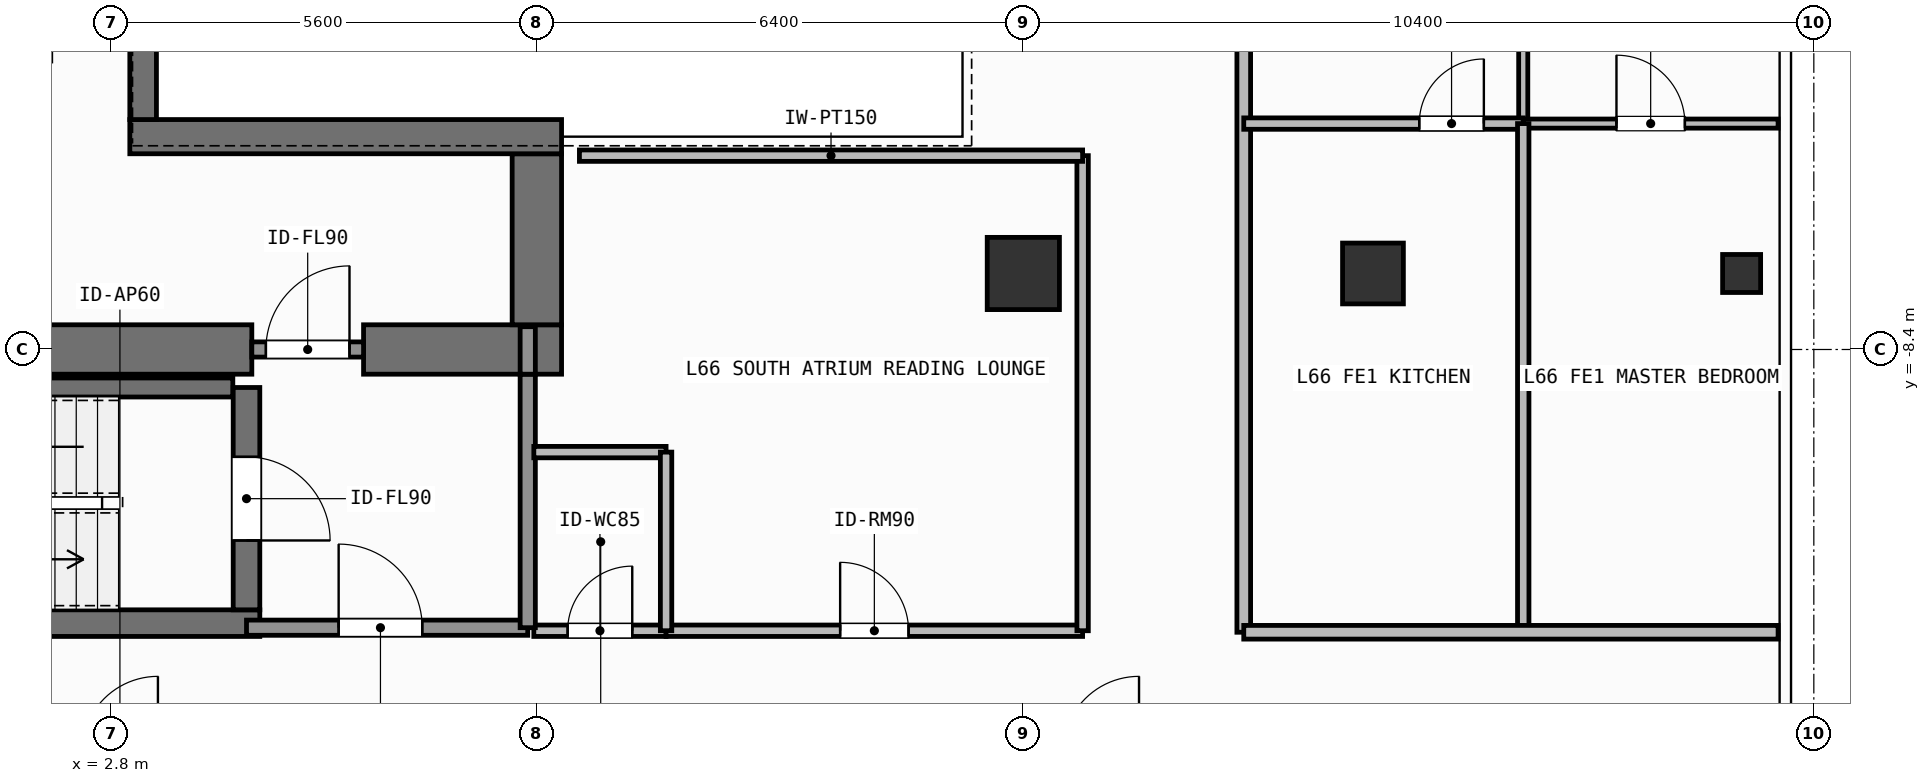
"""IFC4 building model, lengths in metres.
Left out: names, types, materials, properties, quantities, classifications, styles, units other than length and angle.
Written with IfcOpenShell. Run it as: python <this file> out.ifc"""

import sys

from ifc_helpers import new_model, si_unit, direction, frame, frame_2d, origin, origin_2d, place, context, subcontext, project, spatial, rectangle, hollow_rectangle, extrude, element, fill, save


model = new_model("IFC4")
c1 = context("Model", 3, precision=1e-05, world=origin(), true_north=direction((0.0, 1.0)))
c2 = subcontext(c1, "Body", "Model", "MODEL_VIEW")
j1 = project(units=[si_unit("LENGTHUNIT", "METRE"), si_unit("PLANEANGLEUNIT", "RADIAN")], contexts=[c1])
p1 = place(None, origin())
s1 = spatial("IfcSite", under=j1, at=p1, CompositionType="ELEMENT")
p2 = place(p1, origin())
s2 = spatial("IfcBuilding", under=s1, at=p2, CompositionType="ELEMENT")
p3 = place(p2, frame((0.0, 0.0, 270.3)))
s3 = spatial("IfcBuildingStorey", under=s2, at=p3, CompositionType="ELEMENT", Elevation=270.3)
p4 = place(p3, frame((-2.62, -8.4, 0.0), z_axis=(0.0, 0.0, 1.0), x_axis=(1.0, 0.0, 0.0)))
e1 = element("IfcWall", 1, at=p4, inside=s3, PredefinedType="SHEAR", context=c2, shape_type="SweptSolid", body=[
    extrude(rectangle(XDim=7.27, YDim=0.65, at=frame_2d((3.635, 0.0))), origin(), (0.0, 0.0, 1.0), 3.9),
])
p5 = place(p3, frame((6.12, -8.4, 0.0), z_axis=(0.0, 0.0, 1.0), x_axis=(1.0, 0.0, 0.0)))
e2 = element("IfcWall", 2, at=p5, inside=s3, PredefinedType="SHEAR", context=c2, shape_type="SweptSolid", body=[
    extrude(rectangle(XDim=2.605, YDim=0.65, at=frame_2d((1.302, 0.0))), origin(), (0.0, 0.0, 1.0), 3.9),
])
p6 = place(p3, frame((8.4, -8.075, 0.0), z_axis=(0.0, 0.0, 1.0), x_axis=(0.0, 1.0, 0.0)))
e3 = element("IfcWall", 3, at=p6, inside=s3, PredefinedType="SHEAR", context=c2, shape_type="SweptSolid", body=[
    extrude(rectangle(XDim=2.25, YDim=0.65, at=frame_2d((1.125, 0.0))), origin(), (0.0, 0.0, 1.0), 3.9),
])
p7 = place(p3, frame((3.045, -5.6, 0.0), z_axis=(0.0, 0.0, 1.0), x_axis=(1.0, 0.0, 0.0)))
e4 = element("IfcWall", 4, at=p7, inside=s3, PredefinedType="SHEAR", context=c2, shape_type="SweptSolid", body=[
    extrude(rectangle(XDim=5.68, YDim=0.45, at=frame_2d((2.84, 0.0))), origin(), (0.0, 0.0, 1.0), 3.9),
])
p8 = place(p3, frame((3.22, -5.375, 0.0), z_axis=(0.0, 0.0, 1.0), x_axis=(0.0, 1.0, 0.0)))
e5 = element("IfcWall", 5, at=p8, inside=s3, PredefinedType="SHEAR", context=c2, shape_type="SweptSolid", body=[
    extrude(rectangle(XDim=10.75, YDim=0.35, at=frame_2d((5.375, 0.0))), origin(), (0.0, 0.0, 1.0), 3.9),
])
p9 = place(p3, frame((-2.555, -12.0, 0.0), z_axis=(0.0, 0.0, 1.0), x_axis=(1.0, 0.0, 0.0)))
e6 = element("IfcWall", 6, at=p9, inside=s3, PredefinedType="SHEAR", context=c2, shape_type="SweptSolid", body=[
    extrude(rectangle(XDim=7.31, YDim=0.35, at=frame_2d((3.655, 0.0))), origin(), (0.0, 0.0, 1.0), 3.9),
])
p10 = place(p3, frame((-2.2, -8.9, 0.0), z_axis=(0.0, 0.0, 1.0), x_axis=(1.0, 0.0, 0.0)))
e7 = element("IfcWall", 7, at=p10, inside=s3, PredefinedType="SHEAR", context=c2, shape_type="SweptSolid", body=[
    extrude(rectangle(XDim=6.6, YDim=0.25, at=frame_2d((3.3, 0.0))), origin(), (0.0, 0.0, 1.0), 3.9),
])
p11 = place(p3, frame((4.58, -8.9, 0.0), z_axis=(0.0, 0.0, 1.0), x_axis=(0.0, -1.0, 0.0)))
e8 = element("IfcWall", 8, at=p11, inside=s3, PredefinedType="SHEAR", context=c2, shape_type="SweptSolid", body=[
    extrude(rectangle(XDim=2.925, YDim=0.35, at=frame_2d((1.462, 0.0))), origin(), (0.0, 0.0, 1.0), 3.9),
])
p12 = place(p11, frame((0.913, 0.0, 0.0)))
e9 = element("IfcOpeningElement", 9, at=p12, cuts=e8, PredefinedType="OPENING", context=c2, shape_type="SweptSolid", body=[
    extrude(rectangle(XDim=1.1, YDim=2.15, at=frame_2d((0.55, 1.075))), frame((0.0, 0.185, 0.0), z_axis=(0.0, -1.0, 0.0), x_axis=(1.0, 0.0, 0.0)), (0.0, 0.0, 1.0), 0.37),
])
p13 = place(p3, frame((14.8, -7.4, 0.0), z_axis=(0.0, 0.0, 1.0), x_axis=(1.0, 0.0, 0.0)))
e10 = element("IfcColumn", 10, at=p13, inside=s3, PredefinedType="COLUMN", context=c2, shape_type="SweptSolid", body=[
    extrude(rectangle(XDim=0.95, YDim=0.95, at=origin_2d()), origin(), (0.0, 0.0, 1.0), 3.9),
])
p14 = place(p3, frame((19.4, -7.4, 0.0), z_axis=(0.0, 0.0, 1.0), x_axis=(1.0, 0.0, 0.0)))
e11 = element("IfcColumn", 11, at=p14, inside=s3, PredefinedType="COLUMN", context=c2, shape_type="SweptSolid", body=[
    extrude(hollow_rectangle(XDim=0.8, YDim=0.8, WallThickness=0.036, at=origin_2d()), origin(), (0.0, 0.0, 1.0), 3.9),
])
p15 = place(p3, frame((24.25, -7.4, 0.0), z_axis=(0.0, 0.0, 1.0), x_axis=(1.0, 0.0, 0.0)))
e12 = element("IfcColumn", 12, at=p15, inside=s3, PredefinedType="COLUMN", context=c2, shape_type="SweptSolid", body=[
    extrude(hollow_rectangle(XDim=0.5, YDim=0.5, WallThickness=0.025, at=origin_2d()), origin(), (0.0, 0.0, 1.0), 3.9),
])
p16 = place(p3, frame((4.58, -12.06, 0.0), z_axis=(0.0, 0.0, 1.0), x_axis=(1.0, 0.0, 0.0)))
e13 = element("IfcWall", 13, at=p16, inside=s3, PredefinedType="SOLIDWALL", context=c2, shape_type="SweptSolid", body=[
    extrude(rectangle(XDim=3.7, YDim=0.2, at=frame_2d((1.85, 0.0))), origin(), (0.0, 0.0, 1.0), 3.68),
])
p17 = place(p16, frame((1.212, 0.0, 0.0)))
e14 = element("IfcOpeningElement", 14, at=p17, cuts=e13, PredefinedType="OPENING", context=c2, shape_type="SweptSolid", body=[
    extrude(rectangle(XDim=1.1, YDim=2.15, at=frame_2d((0.55, 1.075))), frame((0.0, 0.11, 0.0), z_axis=(0.0, -1.0, 0.0), x_axis=(1.0, 0.0, 0.0)), (0.0, 0.0, 1.0), 0.22),
])
p18 = place(p3, frame((4.65, -8.4, 0.0), z_axis=(0.0, 0.0, 1.0), x_axis=(1.0, 0.0, 0.0)))
e15 = element("IfcWall", 15, at=p18, inside=s3, PredefinedType="SOLIDWALL", context=c2, shape_type="SweptSolid", body=[
    extrude(rectangle(XDim=1.47, YDim=0.2, at=frame_2d((0.735, 0.0))), origin(), (0.0, 0.0, 1.0), 2.92),
])
p19 = place(p18, frame((0.185, 0.0, 0.0)))
e16 = element("IfcOpeningElement", 16, at=p19, cuts=e15, PredefinedType="OPENING", context=c2, shape_type="SweptSolid", body=[
    extrude(rectangle(XDim=1.1, YDim=2.15, at=frame_2d((0.55, 1.075))), frame((0.0, 0.11, 0.0), z_axis=(0.0, -1.0, 0.0), x_axis=(1.0, 0.0, 0.0)), (0.0, 0.0, 1.0), 0.22),
])
p20 = place(p3, frame((8.36, -12.1, 0.0), z_axis=(0.0, 0.0, 1.0), x_axis=(1.0, 0.0, 0.0)))
e17 = element("IfcWall", 17, at=p20, inside=s3, PredefinedType="PARTITIONING", context=c2, shape_type="SweptSolid", body=[
    extrude(rectangle(XDim=1.74, YDim=0.15, at=frame_2d((0.87, 0.0))), origin(), (0.0, 0.0, 1.0), 3.68),
])
p21 = place(p20, frame((0.445, 0.0, 0.0)))
e18 = element("IfcOpeningElement", 18, at=p21, cuts=e17, PredefinedType="OPENING", context=c2, shape_type="SweptSolid", body=[
    extrude(rectangle(XDim=0.85, YDim=2.1, at=frame_2d((0.425, 1.05))), frame((0.0, 0.085, 0.0), z_axis=(0.0, -1.0, 0.0), x_axis=(1.0, 0.0, 0.0)), (0.0, 0.0, 1.0), 0.17),
])
p22 = place(p3, frame((10.1, -12.1, 0.0), z_axis=(0.0, 0.0, 1.0), x_axis=(1.0, 0.0, 0.0)))
e19 = element("IfcWall", 19, at=p22, inside=s3, PredefinedType="PARTITIONING", context=c2, shape_type="SweptSolid", body=[
    extrude(rectangle(XDim=5.48, YDim=0.15, at=frame_2d((2.74, 0.0))), origin(), (0.0, 0.0, 1.0), 3.68),
])
p23 = place(p22, frame((2.29, 0.0, 0.0)))
e20 = element("IfcOpeningElement", 20, at=p23, cuts=e19, PredefinedType="OPENING", context=c2, shape_type="SweptSolid", body=[
    extrude(rectangle(XDim=0.9, YDim=2.1, at=frame_2d((0.45, 1.05))), frame((0.0, 0.085, 0.0), z_axis=(0.0, -1.0, 0.0), x_axis=(1.0, 0.0, 0.0)), (0.0, 0.0, 1.0), 0.17),
])
p24 = place(p3, frame((17.7, -12.12, 0.0), z_axis=(0.0, 0.0, 1.0), x_axis=(0.0, 1.0, 0.0)))
e21 = element("IfcWall", 21, at=p24, inside=s3, PredefinedType="PARTITIONING", context=c2, shape_type="SweptSolid", body=[
    extrude(rectangle(XDim=24.24, YDim=0.18, at=frame_2d((12.12, 0.0))), origin(), (0.0, 0.0, 1.0), 3.68),
])
p25 = place(p24, frame((11.62, 0.0, 0.0)))
e22 = element("IfcOpeningElement", 22, at=p25, cuts=e21, PredefinedType="OPENING", context=c2, shape_type="SweptSolid", body=[
    extrude(rectangle(XDim=1.0, YDim=2.2, at=frame_2d((0.5, 1.1))), frame((0.0, 0.1, 0.0), z_axis=(0.0, -1.0, 0.0), x_axis=(1.0, 0.0, 0.0)), (0.0, 0.0, 1.0), 0.2),
])
p26 = place(p3, frame((21.377, -5.428, 0.0), z_axis=(0.0, 0.0, 1.0), x_axis=(0.0, 1.0, 0.0)))
e23 = element("IfcWall", 23, at=p26, inside=s3, PredefinedType="PARTITIONING", context=c2, shape_type="SweptSolid", body=[
    extrude(rectangle(XDim=10.856, YDim=0.12, at=frame_2d((5.428, 0.0))), origin(), (0.0, 0.0, 1.0), 3.68),
])
p27 = place(p26, frame((4.978, 0.0, 0.0)))
e24 = element("IfcOpeningElement", 24, at=p27, cuts=e23, PredefinedType="OPENING", context=c2, shape_type="SweptSolid", body=[
    extrude(rectangle(XDim=0.9, YDim=2.1, at=frame_2d((0.45, 1.05))), frame((0.0, 0.07, 0.0), z_axis=(0.0, -1.0, 0.0), x_axis=(1.0, 0.0, 0.0)), (0.0, 0.0, 1.0), 0.14),
])
p28 = place(p3, frame((17.7, -5.428, 0.0), z_axis=(0.0, 0.0, 1.0), x_axis=(1.0, 0.0, 0.0)))
e25 = element("IfcWall", 25, at=p28, inside=s3, PredefinedType="PARTITIONING", context=c2, shape_type="SweptSolid", body=[
    extrude(rectangle(XDim=3.677, YDim=0.15, at=frame_2d((1.838, 0.0))), origin(), (0.0, 0.0, 1.0), 3.68),
])
p29 = place(p28, frame((2.309, 0.0, 0.0)))
e26 = element("IfcOpeningElement", 26, at=p29, cuts=e25, PredefinedType="OPENING", context=c2, shape_type="SweptSolid", body=[
    extrude(rectangle(XDim=0.85, YDim=2.1, at=frame_2d((0.425, 1.05))), frame((0.0, 0.085, 0.0), z_axis=(0.0, -1.0, 0.0), x_axis=(1.0, 0.0, 0.0)), (0.0, 0.0, 1.0), 0.17),
])
p30 = place(p3, frame((21.377, -5.428, 0.0), z_axis=(0.0, 0.0, 1.0), x_axis=(1.0, 0.0, 0.0)))
e27 = element("IfcWall", 27, at=p30, inside=s3, PredefinedType="PARTITIONING", context=c2, shape_type="SweptSolid", body=[
    extrude(rectangle(XDim=3.353, YDim=0.12, at=frame_2d((1.677, 0.0))), origin(), (0.0, 0.0, 1.0), 3.68),
])
p31 = place(p30, frame((1.227, 0.0, 0.0)))
e28 = element("IfcOpeningElement", 28, at=p31, cuts=e27, PredefinedType="OPENING", context=c2, shape_type="SweptSolid", body=[
    extrude(rectangle(XDim=0.9, YDim=2.1, at=frame_2d((0.45, 1.05))), frame((0.0, 0.07, 0.0), z_axis=(0.0, -1.0, 0.0), x_axis=(1.0, 0.0, 0.0)), (0.0, 0.0, 1.0), 0.14),
])
p32 = place(p3, frame((8.28, -12.06, 0.0), z_axis=(0.0, 0.0, 1.0), x_axis=(0.0, 1.0, 0.0)))
e29 = element("IfcWall", 29, at=p32, inside=s3, PredefinedType="SOLIDWALL", context=c2, shape_type="SweptSolid", body=[
    extrude(rectangle(XDim=3.335, YDim=0.2, at=frame_2d((1.667, 0.0))), origin(), (0.0, 0.0, 1.0), 3.68),
])
p33 = place(p3, frame((8.28, -8.725, 0.0), z_axis=(0.0, 0.0, 1.0), x_axis=(0.0, 1.0, 0.0)))
e30 = element("IfcWall", 30, at=p33, inside=s3, PredefinedType="SOLIDWALL", context=c2, shape_type="SweptSolid", body=[
    extrude(rectangle(XDim=0.625, YDim=0.2, at=frame_2d((0.312, 0.0))), origin(), (0.0, 0.0, 1.0), 3.68),
])
p34 = place(p3, frame((8.36, -9.75, 0.0), z_axis=(0.0, 0.0, 1.0), x_axis=(1.0, 0.0, 0.0)))
e31 = element("IfcWall", 31, at=p34, inside=s3, PredefinedType="PARTITIONING", context=c2, shape_type="SweptSolid", body=[
    extrude(rectangle(XDim=1.74, YDim=0.15, at=frame_2d((0.87, 0.0))), origin(), (0.0, 0.0, 1.0), 3.68),
])
p35 = place(p3, frame((10.1, -12.1, 0.0), z_axis=(0.0, 0.0, 1.0), x_axis=(0.0, 1.0, 0.0)))
e32 = element("IfcWall", 32, at=p35, inside=s3, PredefinedType="PARTITIONING", context=c2, shape_type="SweptSolid", body=[
    extrude(rectangle(XDim=2.35, YDim=0.15, at=frame_2d((1.175, 0.0))), origin(), (0.0, 0.0, 1.0), 3.68),
])
p36 = place(p3, frame((15.58, -12.1, 0.0), z_axis=(0.0, 0.0, 1.0), x_axis=(0.0, 1.0, 0.0)))
e33 = element("IfcWall", 33, at=p36, inside=s3, PredefinedType="PARTITIONING", context=c2, shape_type="SweptSolid", body=[
    extrude(rectangle(XDim=6.25, YDim=0.15, at=frame_2d((3.125, 0.0))), origin(), (0.0, 0.0, 1.0), 3.68),
])
p37 = place(p3, frame((8.96, -5.85, 0.0), z_axis=(0.0, 0.0, 1.0), x_axis=(1.0, 0.0, 0.0)))
e34 = element("IfcWall", 34, at=p37, inside=s3, PredefinedType="PARTITIONING", context=c2, shape_type="SweptSolid", body=[
    extrude(rectangle(XDim=6.62, YDim=0.15, at=frame_2d((3.31, 0.0))), origin(), (0.0, 0.0, 1.0), 3.68),
])
p38 = place(p3, frame((21.377, -12.12, 0.0), z_axis=(0.0, 0.0, 1.0), x_axis=(0.0, 1.0, 0.0)))
e35 = element("IfcWall", 35, at=p38, inside=s3, PredefinedType="PARTITIONING", context=c2, shape_type="SweptSolid", body=[
    extrude(rectangle(XDim=6.692, YDim=0.15, at=frame_2d((3.346, 0.0))), origin(), (0.0, 0.0, 1.0), 3.68),
])
p39 = place(p3, frame((17.7, -12.12, 0.0), z_axis=(0.0, 0.0, 1.0), x_axis=(1.0, 0.0, 0.0)))
e36 = element("IfcWall", 36, at=p39, inside=s3, PredefinedType="PARTITIONING", context=c2, shape_type="SweptSolid", body=[
    extrude(rectangle(XDim=7.03, YDim=0.18, at=frame_2d((3.515, 0.0))), origin(), (0.0, 0.0, 1.0), 3.68),
])
p40 = place(p12, origin())
e37 = element("IfcDoor", 37, at=p40, inside=s3, OperationType="SINGLE_SWING_RIGHT", PredefinedType="DOOR", context=c2, shape_type="SweptSolid", body=[
    extrude(rectangle(XDim=1.1, YDim=2.15, at=frame_2d((0.55, 1.075))), frame((0.0, 0.025, 0.0), z_axis=(0.0, -1.0, 0.0), x_axis=(1.0, 0.0, 0.0)), (0.0, 0.0, 1.0), 0.05),
])
fill(e9, e37)
p41 = place(p17, origin())
e38 = element("IfcDoor", 38, at=p41, inside=s3, OperationType="SINGLE_SWING_LEFT", PredefinedType="DOOR", context=c2, shape_type="SweptSolid", body=[
    extrude(rectangle(XDim=1.1, YDim=2.15, at=frame_2d((0.55, 1.075))), frame((0.0, 0.025, 0.0), z_axis=(0.0, -1.0, 0.0), x_axis=(1.0, 0.0, 0.0)), (0.0, 0.0, 1.0), 0.05),
])
fill(e14, e38)
p42 = place(p19, origin())
e39 = element("IfcDoor", 39, at=p42, inside=s3, OperationType="SINGLE_SWING_RIGHT", PredefinedType="DOOR", context=c2, shape_type="SweptSolid", body=[
    extrude(rectangle(XDim=1.1, YDim=2.15, at=frame_2d((0.55, 1.075))), frame((0.0, 0.025, 0.0), z_axis=(0.0, -1.0, 0.0), x_axis=(1.0, 0.0, 0.0)), (0.0, 0.0, 1.0), 0.05),
])
fill(e16, e39)
p43 = place(p21, origin())
e40 = element("IfcDoor", 40, at=p43, inside=s3, OperationType="SINGLE_SWING_RIGHT", PredefinedType="DOOR", context=c2, shape_type="SweptSolid", body=[
    extrude(rectangle(XDim=0.85, YDim=2.1, at=frame_2d((0.425, 1.05))), frame((0.0, 0.025, 0.0), z_axis=(0.0, -1.0, 0.0), x_axis=(1.0, 0.0, 0.0)), (0.0, 0.0, 1.0), 0.05),
])
fill(e18, e40)
p44 = place(p23, origin())
e41 = element("IfcDoor", 41, at=p44, inside=s3, OperationType="SINGLE_SWING_LEFT", PredefinedType="DOOR", context=c2, shape_type="SweptSolid", body=[
    extrude(rectangle(XDim=0.9, YDim=2.1, at=frame_2d((0.45, 1.05))), frame((0.0, 0.025, 0.0), z_axis=(0.0, -1.0, 0.0), x_axis=(1.0, 0.0, 0.0)), (0.0, 0.0, 1.0), 0.05),
])
fill(e20, e41)
p45 = place(p29, origin())
e42 = element("IfcDoor", 42, at=p45, inside=s3, OperationType="SINGLE_SWING_RIGHT", PredefinedType="DOOR", context=c2, shape_type="SweptSolid", body=[
    extrude(rectangle(XDim=0.85, YDim=2.1, at=frame_2d((0.425, 1.05))), frame((0.0, 0.025, 0.0), z_axis=(0.0, -1.0, 0.0), x_axis=(1.0, 0.0, 0.0)), (0.0, 0.0, 1.0), 0.05),
])
fill(e26, e42)
p46 = place(p31, origin())
e43 = element("IfcDoor", 43, at=p46, inside=s3, OperationType="SINGLE_SWING_LEFT", PredefinedType="DOOR", context=c2, shape_type="SweptSolid", body=[
    extrude(rectangle(XDim=0.9, YDim=2.1, at=frame_2d((0.45, 1.05))), frame((0.0, 0.025, 0.0), z_axis=(0.0, -1.0, 0.0), x_axis=(1.0, 0.0, 0.0)), (0.0, 0.0, 1.0), 0.05),
])
fill(e28, e43)
save(model, sys.argv[1])
